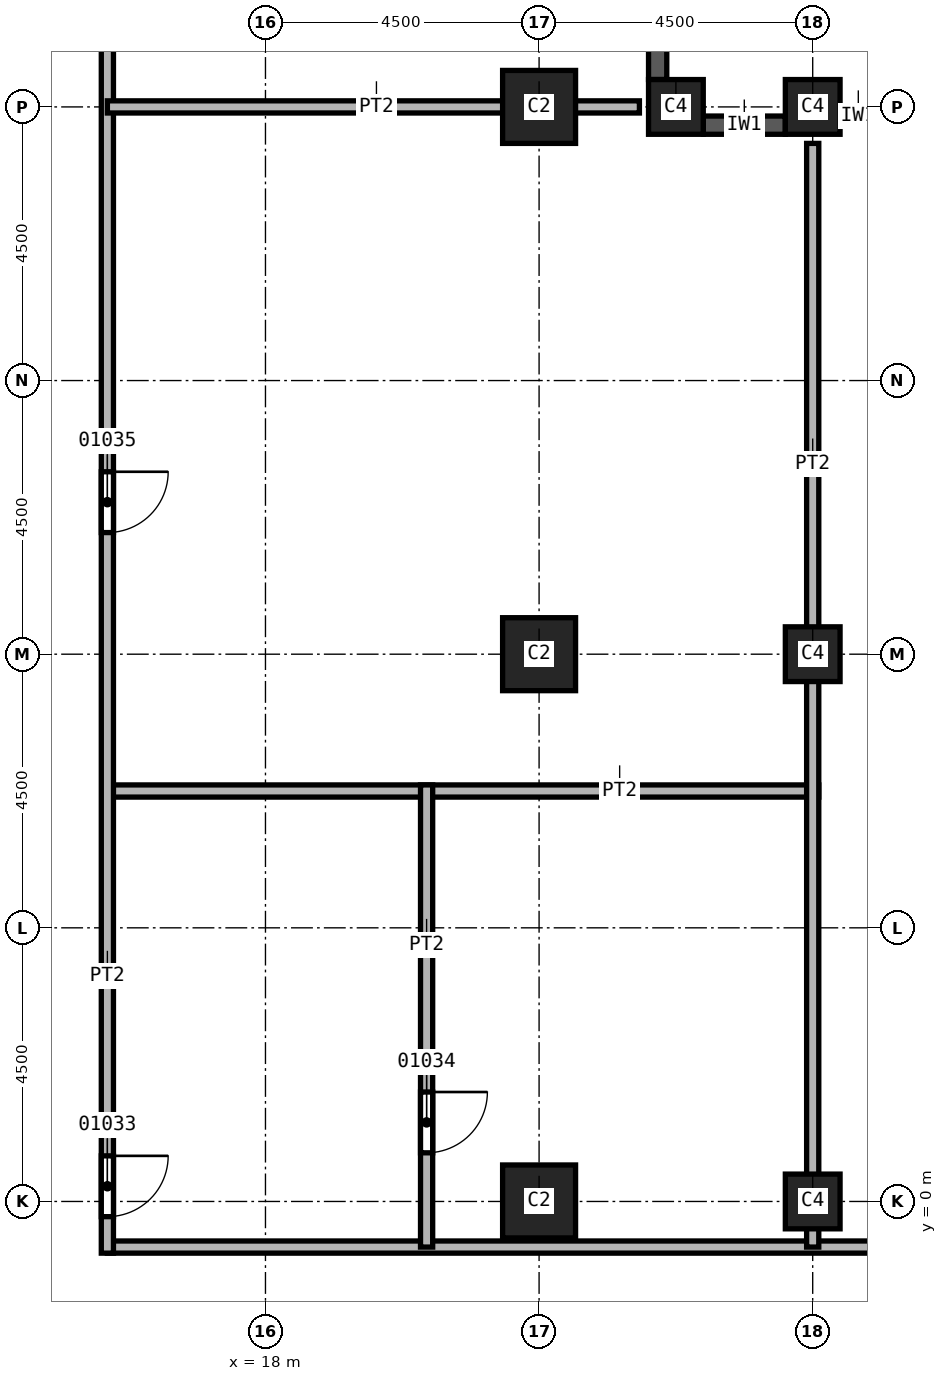
"""IFC4 building model, lengths in metres.
Left out: names, types, materials, properties, quantities, classifications, styles, units other than length and angle.
Written with IfcOpenShell. Run it as: python <this file> out.ifc"""

import sys

from ifc_helpers import new_model, si_unit, direction, frame, frame_2d, origin, origin_2d, place, context, subcontext, project, spatial, rectangle, extrude, element, fill, save


model = new_model("IFC4")
c1 = context("Model", 3, precision=1e-05, world=origin(), true_north=direction((0.0, 1.0)))
c2 = subcontext(c1, "Body", "Model", "MODEL_VIEW")
j1 = project(units=[si_unit("LENGTHUNIT", "METRE"), si_unit("PLANEANGLEUNIT", "RADIAN")], contexts=[c1])
p1 = place(None, origin())
s1 = spatial("IfcSite", under=j1, at=p1, CompositionType="ELEMENT")
p2 = place(p1, origin())
s2 = spatial("IfcBuilding", under=s1, at=p2, CompositionType="ELEMENT")
p3 = place(p2, frame((0.0, 0.0, 72.0)))
s3 = spatial("IfcBuildingStorey", under=s2, at=p3, CompositionType="ELEMENT", Elevation=72.0)
for number, where, z_axis, x_axis in (
    (1, (22.5, 0.0, 0.0), (0.0, 0.0, 1.0), (1.0, 0.0, 0.0)),
    (2, (22.5, 9.0, 0.0), (0.0, 0.0, 1.0), (1.0, 0.0, 0.0)),
    (3, (22.5, 18.0, 0.0), (0.0, 0.0, 1.0), (1.0, 0.0, 0.0)),
):
    element("IfcColumn", number, at=place(p3, frame(where, z_axis=z_axis, x_axis=x_axis)), inside=s3, PredefinedType="COLUMN", context=c2, shape_type="SweptSolid", body=[
        extrude(rectangle(XDim=1.2, YDim=1.2, at=origin_2d()), origin(), (0.0, 0.0, 1.0), 3.7),
    ])
for number, where, z_axis, x_axis in (
    (4, (27.0, 0.0, 0.0), (0.0, 0.0, 1.0), (1.0, 0.0, 0.0)),
    (5, (27.0, 9.0, 0.0), (0.0, 0.0, 1.0), (1.0, 0.0, 0.0)),
    (6, (27.0, 18.0, 0.0), (0.0, 0.0, 1.0), (1.0, 0.0, 0.0)),
    (7, (24.75, 18.0, 0.0), (0.0, 0.0, 1.0), (1.0, 0.0, 0.0)),
):
    element("IfcColumn", number, at=place(p3, frame(where, z_axis=z_axis, x_axis=x_axis)), inside=s3, PredefinedType="COLUMN", context=c2, shape_type="SweptSolid", body=[
        extrude(rectangle(XDim=0.9, YDim=0.9, at=origin_2d()), origin(), (0.0, 0.0, 1.0), 3.7),
    ])
p4 = place(p3, frame((31.05, 17.85, 0.0), z_axis=(0.0, 0.0, 1.0), x_axis=(-1.0, 0.0, 0.0)))
e8 = element("IfcWall", 8, at=p4, inside=s3, PredefinedType="SOLIDWALL", context=c2, shape_type="SweptSolid", body=[
    extrude(rectangle(XDim=3.6, YDim=0.3, at=frame_2d((1.8, 0.0))), origin(), (0.0, 0.0, 1.0), 3.1),
])
p5 = place(p4, frame((0.6, 0.0, 0.8)))
e9 = element("IfcOpeningElement", 9, at=p5, cuts=e8, PredefinedType="OPENING", context=c2, shape_type="SweptSolid", body=[
    extrude(rectangle(XDim=2.4, YDim=1.95, at=frame_2d((1.2, 0.975))), frame((0.0, 0.15, 0.0), z_axis=(0.0, -1.0, 0.0), x_axis=(1.0, 0.0, 0.0)), (0.0, 0.0, 1.0), 0.3),
])
p6 = place(p3, frame((26.55, 17.7, 0.0), z_axis=(0.0, 0.0, 1.0), x_axis=(-1.0, 0.0, 0.0)))
e10 = element("IfcWall", 10, at=p6, inside=s3, PredefinedType="SOLIDWALL", context=c2, shape_type="SweptSolid", body=[
    extrude(rectangle(XDim=1.35, YDim=0.3, at=frame_2d((0.675, 0.0))), origin(), (0.0, 0.0, 1.0), 3.1),
])
p7 = place(p3, frame((24.45, 18.45, 0.0), z_axis=(0.0, 0.0, 1.0), x_axis=(0.0, 1.0, 0.0)))
e11 = element("IfcWall", 11, at=p7, inside=s3, PredefinedType="SOLIDWALL", context=c2, shape_type="SweptSolid", body=[
    extrude(rectangle(XDim=2.5, YDim=0.3, at=frame_2d((1.25, 0.0))), origin(), (0.0, 0.0, 1.0), 3.1),
])
p8 = place(p3, frame((15.4, -0.75, 0.0), z_axis=(0.0, 0.0, 1.0), x_axis=(1.0, 0.0, 0.0)))
e12 = element("IfcWall", 12, at=p8, inside=s3, PredefinedType="PARTITIONING", context=c2, shape_type="SweptSolid", body=[
    extrude(rectangle(XDim=18.45, YDim=0.2, at=frame_2d((9.225, 0.0))), origin(), (0.0, 0.0, 1.0), 3.7),
])
p9 = place(p3, frame((15.4, 6.75, 0.0), z_axis=(0.0, 0.0, 1.0), x_axis=(1.0, 0.0, 0.0)))
e13 = element("IfcWall", 13, at=p9, inside=s3, PredefinedType="PARTITIONING", context=c2, shape_type="SweptSolid", body=[
    extrude(rectangle(XDim=11.7, YDim=0.2, at=frame_2d((5.85, 0.0))), origin(), (0.0, 0.0, 1.0), 3.7),
])
p10 = place(p3, frame((15.4, 24.5, 0.0), z_axis=(0.0, 0.0, 1.0), x_axis=(0.0, -1.0, 0.0)))
e14 = element("IfcWall", 14, at=p10, inside=s3, PredefinedType="PARTITIONING", context=c2, shape_type="SweptSolid", body=[
    extrude(rectangle(XDim=25.35, YDim=0.2, at=frame_2d((12.675, 0.0))), origin(), (0.0, 0.0, 1.0), 3.7),
])
p11 = place(p10, frame((23.75, 0.0, 0.0)))
e15 = element("IfcOpeningElement", 15, at=p11, cuts=e14, PredefinedType="OPENING", context=c2, shape_type="SweptSolid", body=[
    extrude(rectangle(XDim=1.0, YDim=2.1, at=frame_2d((0.5, 1.05))), frame((0.0, 0.1, 0.0), z_axis=(0.0, -1.0, 0.0), x_axis=(1.0, 0.0, 0.0)), (0.0, 0.0, 1.0), 0.2),
])
p12 = place(p10, frame((12.5, 0.0, 0.0)))
e16 = element("IfcOpeningElement", 16, at=p12, cuts=e14, PredefinedType="OPENING", context=c2, shape_type="SweptSolid", body=[
    extrude(rectangle(XDim=1.0, YDim=2.1, at=frame_2d((0.5, 1.05))), frame((0.0, 0.1, 0.0), z_axis=(0.0, -1.0, 0.0), x_axis=(1.0, 0.0, 0.0)), (0.0, 0.0, 1.0), 0.2),
])
p13 = place(p10, frame((2.8, 0.0, 0.0)))
e17 = element("IfcOpeningElement", 17, at=p13, cuts=e14, PredefinedType="OPENING", context=c2, shape_type="SweptSolid", body=[
    extrude(rectangle(XDim=1.0, YDim=2.1, at=frame_2d((0.5, 1.05))), frame((0.0, 0.1, 0.0), z_axis=(0.0, -1.0, 0.0), x_axis=(1.0, 0.0, 0.0)), (0.0, 0.0, 1.0), 0.2),
])
p14 = place(p3, frame((15.4, 18.0, 0.0), z_axis=(0.0, 0.0, 1.0), x_axis=(1.0, 0.0, 0.0)))
e18 = element("IfcWall", 18, at=p14, inside=s3, PredefinedType="PARTITIONING", context=c2, shape_type="SweptSolid", body=[
    extrude(rectangle(XDim=8.75, YDim=0.2, at=frame_2d((4.375, 0.0))), origin(), (0.0, 0.0, 1.0), 3.7),
])
p15 = place(p3, frame((20.65, 6.85, 0.0), z_axis=(0.0, 0.0, 1.0), x_axis=(0.0, -1.0, 0.0)))
e19 = element("IfcWall", 19, at=p15, inside=s3, PredefinedType="PARTITIONING", context=c2, shape_type="SweptSolid", body=[
    extrude(rectangle(XDim=7.6, YDim=0.2, at=frame_2d((3.8, 0.0))), origin(), (0.0, 0.0, 1.0), 3.7),
])
p16 = place(p15, frame((5.05, 0.0, 0.0)))
e20 = element("IfcOpeningElement", 20, at=p16, cuts=e19, PredefinedType="OPENING", context=c2, shape_type="SweptSolid", body=[
    extrude(rectangle(XDim=1.0, YDim=2.1, at=frame_2d((0.5, 1.05))), frame((0.0, 0.1, 0.0), z_axis=(0.0, -1.0, 0.0), x_axis=(1.0, 0.0, 0.0)), (0.0, 0.0, 1.0), 0.2),
])
p17 = place(p3, frame((27.0, 17.4, 0.0), z_axis=(0.0, 0.0, 1.0), x_axis=(0.0, -1.0, 0.0)))
e21 = element("IfcWall", 21, at=p17, inside=s3, PredefinedType="PARTITIONING", context=c2, shape_type="SweptSolid", body=[
    extrude(rectangle(XDim=18.15, YDim=0.2, at=frame_2d((9.075, 0.0))), origin(), (0.0, 0.0, 1.0), 3.7),
])
p18 = place(p11, origin())
e22 = element("IfcDoor", 22, at=p18, inside=s3, OperationType="SINGLE_SWING_RIGHT", PredefinedType="DOOR", context=c2, shape_type="SweptSolid", body=[
    extrude(rectangle(XDim=1.0, YDim=2.1, at=frame_2d((0.5, 1.05))), frame((0.0, 0.025, 0.0), z_axis=(0.0, -1.0, 0.0), x_axis=(1.0, 0.0, 0.0)), (0.0, 0.0, 1.0), 0.05),
])
fill(e15, e22)
p19 = place(p16, origin())
e23 = element("IfcDoor", 23, at=p19, inside=s3, OperationType="SINGLE_SWING_LEFT", PredefinedType="DOOR", context=c2, shape_type="SweptSolid", body=[
    extrude(rectangle(XDim=1.0, YDim=2.1, at=frame_2d((0.5, 1.05))), frame((0.0, 0.025, 0.0), z_axis=(0.0, -1.0, 0.0), x_axis=(1.0, 0.0, 0.0)), (0.0, 0.0, 1.0), 0.05),
])
fill(e20, e23)
p20 = place(p12, origin())
e24 = element("IfcDoor", 24, at=p20, inside=s3, OperationType="SINGLE_SWING_RIGHT", PredefinedType="DOOR", context=c2, shape_type="SweptSolid", body=[
    extrude(rectangle(XDim=1.0, YDim=2.1, at=frame_2d((0.5, 1.05))), frame((0.0, 0.025, 0.0), z_axis=(0.0, -1.0, 0.0), x_axis=(1.0, 0.0, 0.0)), (0.0, 0.0, 1.0), 0.05),
])
fill(e16, e24)
save(model, sys.argv[1])
